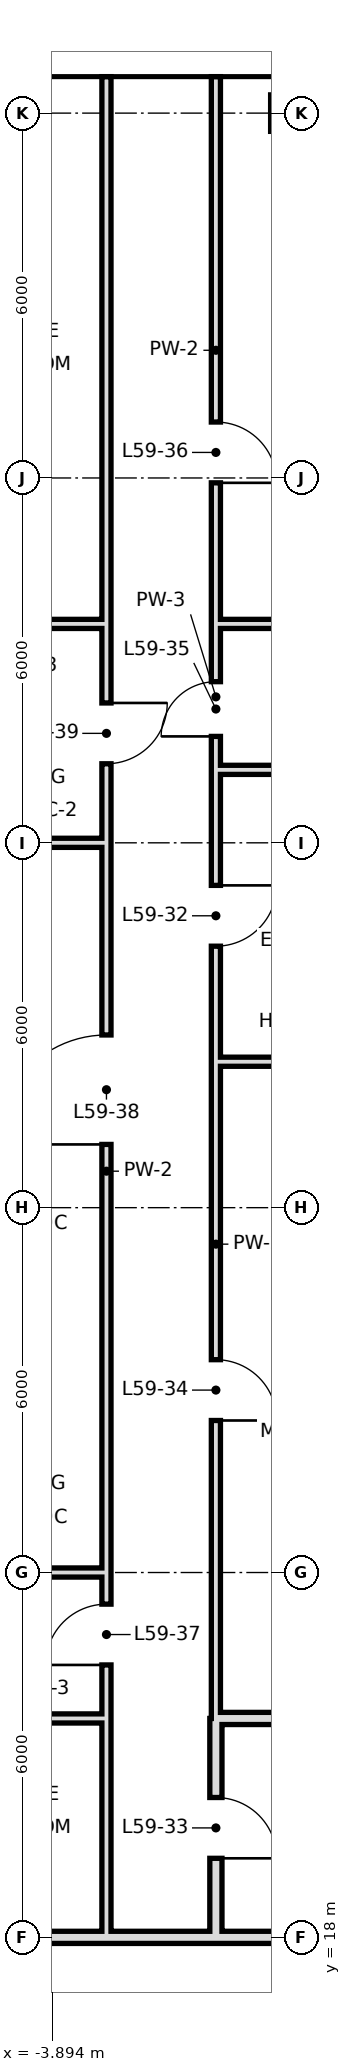
"""IFC4 building model, lengths in metres.
Left out: names, types, materials, properties, quantities, classifications, styles, units other than length and angle.
Written with IfcOpenShell. Run it as: python <this file> out.ifc"""

import sys

from ifc_helpers import new_model, si_unit, direction, frame, frame_2d, origin, place, context, subcontext, project, spatial, rectangle, extrude, element, fill, save


model = new_model("IFC4")
c1 = context("Model", 3, precision=1e-05, world=origin(), true_north=direction((0.0, 1.0)))
c2 = subcontext(c1, "Body", "Model", "MODEL_VIEW")
j1 = project(units=[si_unit("LENGTHUNIT", "METRE"), si_unit("PLANEANGLEUNIT", "RADIAN")], contexts=[c1])
p1 = place(None, origin())
s1 = spatial("IfcSite", under=j1, at=p1, CompositionType="ELEMENT")
p2 = place(p1, origin())
s2 = spatial("IfcBuilding", under=s1, at=p2, CompositionType="ELEMENT")
p3 = place(p2, frame((0.0, 0.0, 250.4)))
s3 = spatial("IfcBuildingStorey", under=s2, at=p3, CompositionType="ELEMENT", Elevation=250.4)
p4 = place(p3, frame((-1.2, 18.0, 0.0), z_axis=(0.0, 0.0, 1.0), x_axis=(0.0, 1.0, 0.0)))
e1 = element("IfcWall", 1, at=p4, inside=s3, PredefinedType="SOLIDWALL", context=c2, shape_type="SweptSolid", body=[
    extrude(rectangle(XDim=3.6, YDim=0.2, at=frame_2d((1.8, 0.0))), origin(), (0.0, 0.0, 1.0), 2.72),
])
p5 = place(p4, frame((1.3, 0.0, 0.0)))
e2 = element("IfcOpeningElement", 2, at=p5, cuts=e1, PredefinedType="OPENING", context=c2, shape_type="SweptSolid", body=[
    extrude(rectangle(XDim=1.0, YDim=2.4, at=frame_2d((0.5, 1.2))), frame((0.0, 0.11, 0.0), z_axis=(0.0, -1.0, 0.0), x_axis=(1.0, 0.0, 0.0)), (0.0, 0.0, 1.0), 0.22),
])
p6 = place(p3, frame((-1.2, 21.6, 0.0), z_axis=(0.0, 0.0, 1.0), x_axis=(0.0, 1.0, 0.0)))
e3 = element("IfcWall", 3, at=p6, inside=s3, PredefinedType="PARTITIONING", context=c2, shape_type="SweptSolid", body=[
    extrude(rectangle(XDim=15.6, YDim=0.15, at=frame_2d((7.8, 0.0))), origin(), (0.0, 0.0, 1.0), 3.42),
])
p7 = place(p6, frame((12.7, 0.0, 0.0)))
e4 = element("IfcOpeningElement", 4, at=p7, cuts=e3, PredefinedType="OPENING", context=c2, shape_type="SweptSolid", body=[
    extrude(rectangle(XDim=1.0, YDim=2.4, at=frame_2d((0.5, 1.2))), frame((0.0, 0.085, 0.0), z_axis=(0.0, -1.0, 0.0), x_axis=(1.0, 0.0, 0.0)), (0.0, 0.0, 1.0), 0.17),
])
p8 = place(p6, frame((4.9, 0.0, 0.0)))
e5 = element("IfcOpeningElement", 5, at=p8, cuts=e3, PredefinedType="OPENING", context=c2, shape_type="SweptSolid", body=[
    extrude(rectangle(XDim=1.0, YDim=2.4, at=frame_2d((0.5, 1.2))), frame((0.0, 0.085, 0.0), z_axis=(0.0, -1.0, 0.0), x_axis=(1.0, 0.0, 0.0)), (0.0, 0.0, 1.0), 0.17),
])
p9 = place(p3, frame((-1.2, 39.6, 0.0), z_axis=(0.0, 0.0, 1.0), x_axis=(0.0, 1.0, 0.0)))
e6 = element("IfcWall", 6, at=p9, inside=s3, PredefinedType="PARTITIONING", context=c2, shape_type="SweptSolid", body=[
    extrude(rectangle(XDim=9.0, YDim=0.15, at=frame_2d((4.5, 0.0))), origin(), (0.0, 0.0, 1.0), 3.42),
])
p10 = place(p9, frame((2.32, 0.0, 0.0)))
e7 = element("IfcOpeningElement", 7, at=p10, cuts=e6, PredefinedType="OPENING", context=c2, shape_type="SweptSolid", body=[
    extrude(rectangle(XDim=1.0, YDim=2.4, at=frame_2d((0.5, 1.2))), frame((0.0, 0.085, 0.0), z_axis=(0.0, -1.0, 0.0), x_axis=(1.0, 0.0, 0.0)), (0.0, 0.0, 1.0), 0.17),
])
p11 = place(p3, frame((-1.2, 37.2, 0.0), z_axis=(0.0, 0.0, 1.0), x_axis=(0.0, 1.0, 0.0)))
e8 = element("IfcWall", 8, at=p11, inside=s3, PredefinedType="PARTITIONING", context=c2, shape_type="SweptSolid", body=[
    extrude(rectangle(XDim=2.4, YDim=0.15, at=frame_2d((1.2, 0.0))), origin(), (0.0, 0.0, 1.0), 3.42),
])
p12 = place(p11, frame((0.55, 0.0, 0.0)))
e9 = element("IfcOpeningElement", 9, at=p12, cuts=e8, PredefinedType="OPENING", context=c2, shape_type="SweptSolid", body=[
    extrude(rectangle(XDim=0.9, YDim=2.4, at=frame_2d((0.45, 1.2))), frame((0.0, 0.085, 0.0), z_axis=(0.0, -1.0, 0.0), x_axis=(1.0, 0.0, 0.0)), (0.0, 0.0, 1.0), 0.17),
])
p13 = place(p3, frame((-3.0, 21.6, 0.0), z_axis=(0.0, 0.0, 1.0), x_axis=(0.0, 1.0, 0.0)))
e10 = element("IfcWall", 10, at=p13, inside=s3, PredefinedType="PARTITIONING", context=c2, shape_type="SweptSolid", body=[
    extrude(rectangle(XDim=18.0, YDim=0.15, at=frame_2d((9.0, 0.0))), origin(), (0.0, 0.0, 1.0), 3.42),
])
p14 = place(p13, frame((0.88, 0.0, 0.0)))
e11 = element("IfcOpeningElement", 11, at=p14, cuts=e10, PredefinedType="OPENING", context=c2, shape_type="SweptSolid", body=[
    extrude(rectangle(XDim=1.0, YDim=2.4, at=frame_2d((0.5, 1.2))), frame((0.0, 0.085, 0.0), z_axis=(0.0, -1.0, 0.0), x_axis=(1.0, 0.0, 0.0)), (0.0, 0.0, 1.0), 0.17),
])
p15 = place(p13, frame((9.44, 0.0, 0.0)))
e12 = element("IfcOpeningElement", 12, at=p15, cuts=e10, PredefinedType="OPENING", context=c2, shape_type="SweptSolid", body=[
    extrude(rectangle(XDim=1.8, YDim=2.4, at=frame_2d((0.9, 1.2))), frame((0.0, 0.085, 0.0), z_axis=(0.0, -1.0, 0.0), x_axis=(1.0, 0.0, 0.0)), (0.0, 0.0, 1.0), 0.17),
])
p16 = place(p13, frame((15.7, 0.0, 0.0)))
e13 = element("IfcOpeningElement", 13, at=p16, cuts=e10, PredefinedType="OPENING", context=c2, shape_type="SweptSolid", body=[
    extrude(rectangle(XDim=1.0, YDim=2.4, at=frame_2d((0.5, 1.2))), frame((0.0, 0.085, 0.0), z_axis=(0.0, -1.0, 0.0), x_axis=(1.0, 0.0, 0.0)), (0.0, 0.0, 1.0), 0.17),
])
p17 = place(p3, frame((-3.0, 18.0, 0.0), z_axis=(0.0, 0.0, 1.0), x_axis=(0.0, 1.0, 0.0)))
e14 = element("IfcWall", 14, at=p17, inside=s3, PredefinedType="PARTITIONING", context=c2, shape_type="SweptSolid", body=[
    extrude(rectangle(XDim=3.6, YDim=0.15, at=frame_2d((1.8, 0.0))), origin(), (0.0, 0.0, 1.0), 3.42),
])
p18 = place(p3, frame((-3.0, 39.6, 0.0), z_axis=(0.0, 0.0, 1.0), x_axis=(0.0, 1.0, 0.0)))
e15 = element("IfcWall", 15, at=p18, inside=s3, PredefinedType="PARTITIONING", context=c2, shape_type="SweptSolid", body=[
    extrude(rectangle(XDim=9.0, YDim=0.15, at=frame_2d((4.5, 0.0))), origin(), (0.0, 0.0, 1.0), 3.42),
])
p19 = place(p3, frame((-1.2, 18.0, 0.0), z_axis=(0.0, 0.0, 1.0), x_axis=(1.0, 0.0, 0.0)))
e16 = element("IfcWall", 16, at=p19, inside=s3, PredefinedType="SOLIDWALL", context=c2, shape_type="SweptSolid", body=[
    extrude(rectangle(XDim=4.3, YDim=0.2, at=frame_2d((2.15, 0.0))), origin(), (0.0, 0.0, 1.0), 2.72),
])
p20 = place(p3, frame((-12.6, 18.0, 0.0), z_axis=(0.0, 0.0, 1.0), x_axis=(1.0, 0.0, 0.0)))
e17 = element("IfcWall", 17, at=p20, inside=s3, PredefinedType="SOLIDWALL", context=c2, shape_type="SweptSolid", body=[
    extrude(rectangle(XDim=11.4, YDim=0.2, at=frame_2d((5.7, 0.0))), origin(), (0.0, 0.0, 1.0), 2.72),
])
p21 = place(p3, frame((-1.2, 21.6, 0.0), z_axis=(0.0, 0.0, 1.0), x_axis=(1.0, 0.0, 0.0)))
e18 = element("IfcWall", 18, at=p21, inside=s3, PredefinedType="SOLIDWALL", context=c2, shape_type="SweptSolid", body=[
    extrude(rectangle(XDim=4.3, YDim=0.2, at=frame_2d((2.15, 0.0))), origin(), (0.0, 0.0, 1.0), 2.72),
])
p22 = place(p3, frame((-6.0, 21.6, 0.0), z_axis=(0.0, 0.0, 1.0), x_axis=(1.0, 0.0, 0.0)))
e19 = element("IfcWall", 19, at=p22, inside=s3, PredefinedType="PARTITIONING", context=c2, shape_type="SweptSolid", body=[
    extrude(rectangle(XDim=3.0, YDim=0.15, at=frame_2d((1.5, 0.0))), origin(), (0.0, 0.0, 1.0), 3.42),
])
p23 = place(p3, frame((-12.0, 24.0, 0.0), z_axis=(0.0, 0.0, 1.0), x_axis=(1.0, 0.0, 0.0)))
e20 = element("IfcWall", 20, at=p23, inside=s3, PredefinedType="PARTITIONING", context=c2, shape_type="SweptSolid", body=[
    extrude(rectangle(XDim=9.0, YDim=0.15, at=frame_2d((4.5, 0.0))), origin(), (0.0, 0.0, 1.0), 2.72),
])
p24 = place(p3, frame((-1.2, 32.4, 0.0), z_axis=(0.0, 0.0, 1.0), x_axis=(1.0, 0.0, 0.0)))
e21 = element("IfcWall", 21, at=p24, inside=s3, PredefinedType="PARTITIONING", context=c2, shape_type="SweptSolid", body=[
    extrude(rectangle(XDim=4.3, YDim=0.15, at=frame_2d((2.15, 0.0))), origin(), (0.0, 0.0, 1.0), 3.42),
])
p25 = place(p3, frame((-12.0, 36.0, 0.0), z_axis=(0.0, 0.0, 1.0), x_axis=(1.0, 0.0, 0.0)))
e22 = element("IfcWall", 22, at=p25, inside=s3, PredefinedType="PARTITIONING", context=c2, shape_type="SweptSolid", body=[
    extrude(rectangle(XDim=9.0, YDim=0.15, at=frame_2d((4.5, 0.0))), origin(), (0.0, 0.0, 1.0), 2.72),
])
p26 = place(p3, frame((-1.2, 37.2, 0.0), z_axis=(0.0, 0.0, 1.0), x_axis=(1.0, 0.0, 0.0)))
e23 = element("IfcWall", 23, at=p26, inside=s3, PredefinedType="PARTITIONING", context=c2, shape_type="SweptSolid", body=[
    extrude(rectangle(XDim=4.3, YDim=0.15, at=frame_2d((2.15, 0.0))), origin(), (0.0, 0.0, 1.0), 3.42),
])
p27 = place(p3, frame((-6.0, 39.6, 0.0), z_axis=(0.0, 0.0, 1.0), x_axis=(1.0, 0.0, 0.0)))
e24 = element("IfcWall", 24, at=p27, inside=s3, PredefinedType="PARTITIONING", context=c2, shape_type="SweptSolid", body=[
    extrude(rectangle(XDim=3.0, YDim=0.15, at=frame_2d((1.5, 0.0))), origin(), (0.0, 0.0, 1.0), 3.42),
])
p28 = place(p3, frame((-1.2, 39.6, 0.0), z_axis=(0.0, 0.0, 1.0), x_axis=(1.0, 0.0, 0.0)))
e25 = element("IfcWall", 25, at=p28, inside=s3, PredefinedType="PARTITIONING", context=c2, shape_type="SweptSolid", body=[
    extrude(rectangle(XDim=4.3, YDim=0.15, at=frame_2d((2.15, 0.0))), origin(), (0.0, 0.0, 1.0), 3.42),
])
p29 = place(p7, origin())
e26 = element("IfcDoor", 26, at=p29, inside=s3, OperationType="SINGLE_SWING_RIGHT", PredefinedType="DOOR", context=c2, shape_type="SweptSolid", body=[
    extrude(rectangle(XDim=1.0, YDim=2.4, at=frame_2d((0.5, 1.2))), frame((0.0, 0.025, 0.0), z_axis=(0.0, -1.0, 0.0), x_axis=(1.0, 0.0, 0.0)), (0.0, 0.0, 1.0), 0.05),
])
fill(e4, e26)
p30 = place(p5, frame((1.0, 0.0, 0.0), z_axis=(0.0, 0.0, 1.0), x_axis=(-1.0, 0.0, 0.0)))
e27 = element("IfcDoor", 27, at=p30, inside=s3, OperationType="SINGLE_SWING_RIGHT", PredefinedType="DOOR", context=c2, shape_type="SweptSolid", body=[
    extrude(rectangle(XDim=1.0, YDim=2.4, at=frame_2d((0.5, 1.2))), frame((0.0, 0.025, 0.0), z_axis=(0.0, -1.0, 0.0), x_axis=(1.0, 0.0, 0.0)), (0.0, 0.0, 1.0), 0.05),
])
fill(e2, e27)
p31 = place(p8, frame((1.0, 0.0, 0.0), z_axis=(0.0, 0.0, 1.0), x_axis=(-1.0, 0.0, 0.0)))
e28 = element("IfcDoor", 28, at=p31, inside=s3, OperationType="SINGLE_SWING_RIGHT", PredefinedType="DOOR", context=c2, shape_type="SweptSolid", body=[
    extrude(rectangle(XDim=1.0, YDim=2.4, at=frame_2d((0.5, 1.2))), frame((0.0, 0.025, 0.0), z_axis=(0.0, -1.0, 0.0), x_axis=(1.0, 0.0, 0.0)), (0.0, 0.0, 1.0), 0.05),
])
fill(e5, e28)
p32 = place(p12, origin())
e29 = element("IfcDoor", 29, at=p32, inside=s3, OperationType="SINGLE_SWING_LEFT", PredefinedType="DOOR", context=c2, shape_type="SweptSolid", body=[
    extrude(rectangle(XDim=0.9, YDim=2.4, at=frame_2d((0.45, 1.2))), frame((0.0, 0.025, 0.0), z_axis=(0.0, -1.0, 0.0), x_axis=(1.0, 0.0, 0.0)), (0.0, 0.0, 1.0), 0.05),
])
fill(e9, e29)
p33 = place(p10, frame((1.0, 0.0, 0.0), z_axis=(0.0, 0.0, 1.0), x_axis=(-1.0, 0.0, 0.0)))
e30 = element("IfcDoor", 30, at=p33, inside=s3, OperationType="SINGLE_SWING_RIGHT", PredefinedType="DOOR", context=c2, shape_type="SweptSolid", body=[
    extrude(rectangle(XDim=1.0, YDim=2.4, at=frame_2d((0.5, 1.2))), frame((0.0, 0.025, 0.0), z_axis=(0.0, -1.0, 0.0), x_axis=(1.0, 0.0, 0.0)), (0.0, 0.0, 1.0), 0.05),
])
fill(e7, e30)
p34 = place(p14, origin())
e31 = element("IfcDoor", 31, at=p34, inside=s3, OperationType="SINGLE_SWING_LEFT", PredefinedType="DOOR", context=c2, shape_type="SweptSolid", body=[
    extrude(rectangle(XDim=1.0, YDim=2.4, at=frame_2d((0.5, 1.2))), frame((0.0, 0.025, 0.0), z_axis=(0.0, -1.0, 0.0), x_axis=(1.0, 0.0, 0.0)), (0.0, 0.0, 1.0), 0.05),
])
fill(e11, e31)
p35 = place(p15, origin())
e32 = element("IfcDoor", 32, at=p35, inside=s3, OperationType="SINGLE_SWING_LEFT", PredefinedType="DOOR", context=c2, shape_type="SweptSolid", body=[
    extrude(rectangle(XDim=1.8, YDim=2.4, at=frame_2d((0.9, 1.2))), frame((0.0, 0.025, 0.0), z_axis=(0.0, -1.0, 0.0), x_axis=(1.0, 0.0, 0.0)), (0.0, 0.0, 1.0), 0.05),
])
fill(e12, e32)
p36 = place(p16, origin())
e33 = element("IfcDoor", 33, at=p36, inside=s3, OperationType="SINGLE_SWING_RIGHT", PredefinedType="DOOR", context=c2, shape_type="SweptSolid", body=[
    extrude(rectangle(XDim=1.0, YDim=2.4, at=frame_2d((0.5, 1.2))), frame((0.0, 0.025, 0.0), z_axis=(0.0, -1.0, 0.0), x_axis=(1.0, 0.0, 0.0)), (0.0, 0.0, 1.0), 0.05),
])
fill(e13, e33)
save(model, sys.argv[1])
